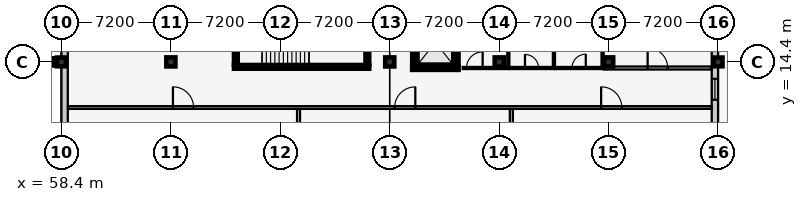
"""IFC4 building model, lengths in metres.
Left out: names, types, materials, properties, quantities, classifications, styles, units other than length and angle.
Written with IfcOpenShell. Run it as: python <this file> out.ifc"""

import sys

from ifc_helpers import new_model, si_unit, direction, frame, frame_2d, origin, origin_2d, place, context, subcontext, project, spatial, rectangle, extrude, element, fill, save


model = new_model("IFC4")
c1 = context("Model", 3, precision=1e-05, world=origin(), true_north=direction((0.0, 1.0)))
c2 = subcontext(c1, "Body", "Model", "MODEL_VIEW")
j1 = project(units=[si_unit("LENGTHUNIT", "METRE"), si_unit("PLANEANGLEUNIT", "RADIAN")], contexts=[c1])
p1 = place(None, origin())
s1 = spatial("IfcSite", under=j1, at=p1, CompositionType="ELEMENT")
p2 = place(p1, origin())
s2 = spatial("IfcBuilding", under=s1, at=p2, CompositionType="ELEMENT")
p3 = place(p2, frame((0.0, 0.0, 9.6)))
s3 = spatial("IfcBuildingStorey", under=s2, at=p3, CompositionType="ELEMENT", Elevation=9.6)
p4 = place(p3, frame((57.6, 14.4, 0.0), z_axis=(0.0, 0.0, 1.0), x_axis=(1.0, 0.0, 0.0)))
e1 = element("IfcColumn", 1, at=p4, inside=s3, PredefinedType="COLUMN", context=c2, shape_type="SweptSolid", body=[
    extrude(rectangle(XDim=0.48, YDim=0.48, at=origin_2d()), origin(), (0.0, 0.0, 1.0), 4.2),
])
p5 = place(p3, frame((58.4, 14.4, 0.0), z_axis=(0.0, 0.0, 1.0), x_axis=(1.0, 0.0, 0.0)))
e2 = element("IfcColumn", 2, at=p5, inside=s3, PredefinedType="COLUMN", context=c2, shape_type="SweptSolid", body=[
    extrude(rectangle(XDim=0.58, YDim=0.58, at=origin_2d()), origin(), (0.0, 0.0, 1.0), 4.2),
])
for number, where, z_axis, x_axis in (
    (3, (65.6, 14.4, 0.0), (0.0, 0.0, 1.0), (1.0, 0.0, 0.0)),
    (4, (80.0, 14.4, 0.0), (0.0, 0.0, 1.0), (1.0, 0.0, 0.0)),
    (5, (87.2, 14.4, 0.0), (0.0, 0.0, 1.0), (1.0, 0.0, 0.0)),
    (6, (94.4, 14.4, 0.0), (0.0, 0.0, 1.0), (1.0, 0.0, 0.0)),
):
    element("IfcColumn", number, at=place(p3, frame(where, z_axis=z_axis, x_axis=x_axis)), inside=s3, PredefinedType="COLUMN", context=c2, shape_type="SweptSolid", body=[
        extrude(rectangle(XDim=0.6, YDim=0.6, at=origin_2d()), origin(), (0.0, 0.0, 1.0), 4.2),
    ])
p6 = place(p3, frame((101.6, 14.4, 0.0), z_axis=(0.0, 0.0, 1.0), x_axis=(1.0, 0.0, 0.0)))
e7 = element("IfcColumn", 7, at=p6, inside=s3, PredefinedType="COLUMN", context=c2, shape_type="SweptSolid", body=[
    extrude(rectangle(XDim=0.58, YDim=0.58, at=origin_2d()), origin(), (0.0, 0.0, 1.0), 4.2),
])
p7 = place(p3, frame((101.39, 21.6, 0.0), z_axis=(0.0, 0.0, 1.0), x_axis=(0.0, -1.0, 0.0)))
e8 = element("IfcWall", 8, at=p7, inside=s3, PredefinedType="SOLIDWALL", context=c2, shape_type="SweptSolid", body=[
    extrude(rectangle(XDim=21.6, YDim=0.42, at=frame_2d((10.8, 0.0))), origin(), (0.0, 0.0, 1.0), 3.355),
])
p8 = place(p7, frame((1.225, 0.0, 0.9)))
e9 = element("IfcOpeningElement", 9, at=p8, cuts=e8, PredefinedType="OPENING", context=c2, shape_type="SweptSolid", body=[
    extrude(rectangle(XDim=1.15, YDim=1.6, at=frame_2d((0.575, 0.8))), frame((0.0, 0.222, 0.0), z_axis=(0.0, -1.0, 0.0), x_axis=(1.0, 0.0, 0.0)), (0.0, 0.0, 1.0), 0.444),
])
p9 = place(p7, frame((4.775, 0.0, 0.9)))
e10 = element("IfcOpeningElement", 10, at=p9, cuts=e8, PredefinedType="OPENING", context=c2, shape_type="SweptSolid", body=[
    extrude(rectangle(XDim=1.25, YDim=1.6, at=frame_2d((0.625, 0.8))), frame((0.0, 0.222, 0.0), z_axis=(0.0, -1.0, 0.0), x_axis=(1.0, 0.0, 0.0)), (0.0, 0.0, 1.0), 0.444),
])
p10 = place(p7, frame((8.31, 0.0, 0.9)))
e11 = element("IfcOpeningElement", 11, at=p10, cuts=e8, PredefinedType="OPENING", context=c2, shape_type="SweptSolid", body=[
    extrude(rectangle(XDim=1.38, YDim=1.6, at=frame_2d((0.69, 0.8))), frame((0.0, 0.222, 0.0), z_axis=(0.0, -1.0, 0.0), x_axis=(1.0, 0.0, 0.0)), (0.0, 0.0, 1.0), 0.444),
])
p11 = place(p7, frame((11.85, 0.0, 0.9)))
e12 = element("IfcOpeningElement", 12, at=p11, cuts=e8, PredefinedType="OPENING", context=c2, shape_type="SweptSolid", body=[
    extrude(rectangle(XDim=1.5, YDim=1.6, at=frame_2d((0.75, 0.8))), frame((0.0, 0.222, 0.0), z_axis=(0.0, -1.0, 0.0), x_axis=(1.0, 0.0, 0.0)), (0.0, 0.0, 1.0), 0.444),
])
p12 = place(p7, frame((15.7, 0.0, 0.9)))
e13 = element("IfcOpeningElement", 13, at=p12, cuts=e8, PredefinedType="OPENING", context=c2, shape_type="SweptSolid", body=[
    extrude(rectangle(XDim=1.0, YDim=1.75, at=frame_2d((0.5, 0.875))), frame((0.0, 0.222, 0.0), z_axis=(0.0, -1.0, 0.0), x_axis=(1.0, 0.0, 0.0)), (0.0, 0.0, 1.0), 0.444),
])
p13 = place(p7, frame((19.24, 0.0, 0.9)))
e14 = element("IfcOpeningElement", 14, at=p13, cuts=e8, PredefinedType="OPENING", context=c2, shape_type="SweptSolid", body=[
    extrude(rectangle(XDim=1.12, YDim=1.75, at=frame_2d((0.56, 0.875))), frame((0.0, 0.222, 0.0), z_axis=(0.0, -1.0, 0.0), x_axis=(1.0, 0.0, 0.0)), (0.0, 0.0, 1.0), 0.444),
])
p14 = place(p3, frame((58.61, 0.0, 0.0), z_axis=(0.0, 0.0, 1.0), x_axis=(0.0, 1.0, 0.0)))
e15 = element("IfcWall", 15, at=p14, inside=s3, PredefinedType="SOLIDWALL", context=c2, shape_type="SweptSolid", body=[
    extrude(rectangle(XDim=21.6, YDim=0.42, at=frame_2d((10.8, 0.0))), origin(), (0.0, 0.0, 1.0), 3.355),
])
p15 = place(p14, frame((1.225, 0.0, 0.9)))
e16 = element("IfcOpeningElement", 16, at=p15, cuts=e15, PredefinedType="OPENING", context=c2, shape_type="SweptSolid", body=[
    extrude(rectangle(XDim=1.15, YDim=1.45, at=frame_2d((0.575, 0.725))), frame((0.0, 0.222, 0.0), z_axis=(0.0, -1.0, 0.0), x_axis=(1.0, 0.0, 0.0)), (0.0, 0.0, 1.0), 0.444),
])
p16 = place(p14, frame((4.775, 0.0, 0.9)))
e17 = element("IfcOpeningElement", 17, at=p16, cuts=e15, PredefinedType="OPENING", context=c2, shape_type="SweptSolid", body=[
    extrude(rectangle(XDim=1.25, YDim=1.45, at=frame_2d((0.625, 0.725))), frame((0.0, 0.222, 0.0), z_axis=(0.0, -1.0, 0.0), x_axis=(1.0, 0.0, 0.0)), (0.0, 0.0, 1.0), 0.444),
])
p17 = place(p14, frame((8.325, 0.0, 0.9)))
e18 = element("IfcOpeningElement", 18, at=p17, cuts=e15, PredefinedType="OPENING", context=c2, shape_type="SweptSolid", body=[
    extrude(rectangle(XDim=1.35, YDim=1.45, at=frame_2d((0.675, 0.725))), frame((0.0, 0.222, 0.0), z_axis=(0.0, -1.0, 0.0), x_axis=(1.0, 0.0, 0.0)), (0.0, 0.0, 1.0), 0.444),
])
p18 = place(p14, frame((15.75, 0.0, 0.9)))
e19 = element("IfcOpeningElement", 19, at=p18, cuts=e15, PredefinedType="OPENING", context=c2, shape_type="SweptSolid", body=[
    extrude(rectangle(XDim=0.9, YDim=1.6, at=frame_2d((0.45, 0.8))), frame((0.0, 0.222, 0.0), z_axis=(0.0, -1.0, 0.0), x_axis=(1.0, 0.0, 0.0)), (0.0, 0.0, 1.0), 0.444),
])
p19 = place(p14, frame((19.275, 0.0, 0.9)))
e20 = element("IfcOpeningElement", 20, at=p19, cuts=e15, PredefinedType="OPENING", context=c2, shape_type="SweptSolid", body=[
    extrude(rectangle(XDim=1.05, YDim=1.6, at=frame_2d((0.525, 0.8))), frame((0.0, 0.222, 0.0), z_axis=(0.0, -1.0, 0.0), x_axis=(1.0, 0.0, 0.0)), (0.0, 0.0, 1.0), 0.444),
])
p20 = place(p3, frame((69.75, 14.075, 0.0), z_axis=(0.0, 0.0, 1.0), x_axis=(1.0, 0.0, 0.0)))
e21 = element("IfcWall", 21, at=p20, inside=s3, PredefinedType="SHEAR", context=c2, shape_type="SweptSolid", body=[
    extrude(rectangle(XDim=8.9, YDim=0.25, at=frame_2d((4.45, 0.0))), origin(), (0.0, 0.0, 1.0), 3.96),
])
p21 = place(p3, frame((69.875, 17.65, 0.0), z_axis=(0.0, 0.0, 1.0), x_axis=(0.0, -1.0, 0.0)))
e22 = element("IfcWall", 22, at=p21, inside=s3, PredefinedType="SHEAR", context=c2, shape_type="SweptSolid", body=[
    extrude(rectangle(XDim=3.45, YDim=0.25, at=frame_2d((1.725, 0.0))), origin(), (0.0, 0.0, 1.0), 3.96),
])
p22 = place(p21, frame((1.15, 0.0, 0.0)))
e23 = element("IfcOpeningElement", 23, at=p22, cuts=e22, PredefinedType="OPENING", context=c2, shape_type="SweptSolid", body=[
    extrude(rectangle(XDim=1.15, YDim=2.15, at=frame_2d((0.575, 1.075))), frame((0.0, 0.137, 0.0), z_axis=(0.0, -1.0, 0.0), x_axis=(1.0, 0.0, 0.0)), (0.0, 0.0, 1.0), 0.274),
])
p23 = place(p3, frame((78.525, 14.2, 0.0), z_axis=(0.0, 0.0, 1.0), x_axis=(0.0, 1.0, 0.0)))
e24 = element("IfcWall", 24, at=p23, inside=s3, PredefinedType="SHEAR", context=c2, shape_type="SweptSolid", body=[
    extrude(rectangle(XDim=3.45, YDim=0.25, at=frame_2d((1.725, 0.0))), origin(), (0.0, 0.0, 1.0), 3.96),
])
p24 = place(p3, frame((81.475, 14.0, 0.0), z_axis=(0.0, 0.0, 1.0), x_axis=(1.0, 0.0, 0.0)))
e25 = element("IfcWall", 25, at=p24, inside=s3, PredefinedType="SHEAR", context=c2, shape_type="SweptSolid", body=[
    extrude(rectangle(XDim=3.05, YDim=0.25, at=frame_2d((1.525, 0.0))), origin(), (0.0, 0.0, 1.0), 3.96),
])
p25 = place(p24, frame((0.725, 0.0, 0.0)))
e26 = element("IfcOpeningElement", 26, at=p25, cuts=e25, PredefinedType="OPENING", context=c2, shape_type="SweptSolid", body=[
    extrude(rectangle(XDim=1.6, YDim=2.3, at=frame_2d((0.8, 1.15))), frame((0.0, 0.137, 0.0), z_axis=(0.0, -1.0, 0.0), x_axis=(1.0, 0.0, 0.0)), (0.0, 0.0, 1.0), 0.274),
])
for number, where, z_axis, x_axis in (
    (27, (81.6, 17.4, 0.0), (0.0, 0.0, 1.0), (0.0, -1.0, 0.0)),
    (28, (84.4, 14.0, 0.0), (0.0, 0.0, 1.0), (0.0, 1.0, 0.0)),
):
    element("IfcWall", number, at=place(p3, frame(where, z_axis=z_axis, x_axis=x_axis)), inside=s3, PredefinedType="SHEAR", context=c2, shape_type="SweptSolid", body=[
        extrude(rectangle(XDim=3.4, YDim=0.25, at=frame_2d((1.7, 0.0))), origin(), (0.0, 0.0, 1.0), 3.96),
    ])
p26 = place(p3, frame((58.83, 11.4, 0.0), z_axis=(0.0, 0.0, 1.0), x_axis=(1.0, 0.0, 0.0)))
e29 = element("IfcWall", 29, at=p26, inside=s3, PredefinedType="PARTITIONING", context=c2, shape_type="SweptSolid", body=[
    extrude(rectangle(XDim=42.34, YDim=0.18, at=frame_2d((21.17, 0.0))), origin(), (0.0, 0.0, 1.0), 3.96),
])
p27 = place(p26, frame((6.905, 0.0, 0.0)))
e30 = element("IfcOpeningElement", 30, at=p27, cuts=e29, PredefinedType="OPENING", context=c2, shape_type="SweptSolid", body=[
    extrude(rectangle(XDim=1.36, YDim=2.2, at=frame_2d((0.68, 1.1))), frame((0.0, 0.102, 0.0), z_axis=(0.0, -1.0, 0.0), x_axis=(1.0, 0.0, 0.0)), (0.0, 0.0, 1.0), 0.204),
])
p28 = place(p26, frame((21.49, 0.0, 0.0)))
e31 = element("IfcOpeningElement", 31, at=p28, cuts=e29, PredefinedType="OPENING", context=c2, shape_type="SweptSolid", body=[
    extrude(rectangle(XDim=1.36, YDim=2.2, at=frame_2d((0.68, 1.1))), frame((0.0, 0.102, 0.0), z_axis=(0.0, -1.0, 0.0), x_axis=(1.0, 0.0, 0.0)), (0.0, 0.0, 1.0), 0.204),
])
p29 = place(p26, frame((35.075, 0.0, 0.0)))
e32 = element("IfcOpeningElement", 32, at=p29, cuts=e29, PredefinedType="OPENING", context=c2, shape_type="SweptSolid", body=[
    extrude(rectangle(XDim=1.36, YDim=2.2, at=frame_2d((0.68, 1.1))), frame((0.0, 0.102, 0.0), z_axis=(0.0, -1.0, 0.0), x_axis=(1.0, 0.0, 0.0)), (0.0, 0.0, 1.0), 0.204),
])
for number, where, z_axis, x_axis in (
    (33, (74.0, 0.43, 0.0), (0.0, 0.0, 1.0), (0.0, 1.0, 0.0)),
    (34, (88.0, 0.43, 0.0), (0.0, 0.0, 1.0), (0.0, 1.0, 0.0)),
):
    element("IfcWall", number, at=place(p3, frame(where, z_axis=z_axis, x_axis=x_axis)), inside=s3, PredefinedType="PARTITIONING", context=c2, shape_type="SweptSolid", body=[
        extrude(rectangle(XDim=10.87, YDim=0.2, at=frame_2d((5.435, 0.0))), origin(), (0.0, 0.0, 1.0), 3.96),
    ])
p30 = place(p3, frame((84.8, 14.0, 0.0), z_axis=(0.0, 0.0, 1.0), x_axis=(1.0, 0.0, 0.0)))
e35 = element("IfcWall", 35, at=p30, inside=s3, PredefinedType="PARTITIONING", context=c2, shape_type="SweptSolid", body=[
    extrude(rectangle(XDim=3.0, YDim=0.14, at=frame_2d((1.5, 0.0))), origin(), (0.0, 0.0, 1.0), 3.96),
])
p31 = place(p30, frame((0.25, 0.0, 0.0)))
e36 = element("IfcOpeningElement", 36, at=p31, cuts=e35, PredefinedType="OPENING", context=c2, shape_type="SweptSolid", body=[
    extrude(rectangle(XDim=1.06, YDim=2.1, at=frame_2d((0.53, 1.05))), frame((0.0, 0.082, 0.0), z_axis=(0.0, -1.0, 0.0), x_axis=(1.0, 0.0, 0.0)), (0.0, 0.0, 1.0), 0.164),
])
p32 = place(p3, frame((87.8, 14.08, 0.0), z_axis=(0.0, 0.0, 1.0), x_axis=(0.0, 1.0, 0.0)))
e37 = element("IfcWall", 37, at=p32, inside=s3, PredefinedType="PARTITIONING", context=c2, shape_type="SweptSolid", body=[
    extrude(rectangle(XDim=7.09, YDim=0.14, at=frame_2d((3.545, 0.0))), origin(), (0.0, 0.0, 1.0), 3.96),
])
p33 = place(p3, frame((87.88, 14.0, 0.0), z_axis=(0.0, 0.0, 1.0), x_axis=(1.0, 0.0, 0.0)))
e38 = element("IfcWall", 38, at=p33, inside=s3, PredefinedType="PARTITIONING", context=c2, shape_type="SweptSolid", body=[
    extrude(rectangle(XDim=2.92, YDim=0.14, at=frame_2d((1.46, 0.0))), origin(), (0.0, 0.0, 1.0), 3.96),
])
p34 = place(p33, frame((1.015, 0.0, 0.0)))
e39 = element("IfcOpeningElement", 39, at=p34, cuts=e38, PredefinedType="OPENING", context=c2, shape_type="SweptSolid", body=[
    extrude(rectangle(XDim=0.89, YDim=2.05, at=frame_2d((0.445, 1.025))), frame((0.0, 0.082, 0.0), z_axis=(0.0, -1.0, 0.0), x_axis=(1.0, 0.0, 0.0)), (0.0, 0.0, 1.0), 0.164),
])
p35 = place(p3, frame((90.8, 14.08, 0.0), z_axis=(0.0, 0.0, 1.0), x_axis=(0.0, 1.0, 0.0)))
e40 = element("IfcWall", 40, at=p35, inside=s3, PredefinedType="PARTITIONING", context=c2, shape_type="SweptSolid", body=[
    extrude(rectangle(XDim=7.09, YDim=0.14, at=frame_2d((3.545, 0.0))), origin(), (0.0, 0.0, 1.0), 3.745),
])
p36 = place(p3, frame((90.88, 14.0, 0.0), z_axis=(0.0, 0.0, 1.0), x_axis=(1.0, 0.0, 0.0)))
e41 = element("IfcWall", 41, at=p36, inside=s3, PredefinedType="PARTITIONING", context=c2, shape_type="SweptSolid", body=[
    extrude(rectangle(XDim=3.12, YDim=0.14, at=frame_2d((1.56, 0.0))), origin(), (0.0, 0.0, 1.0), 3.96),
])
p37 = place(p36, frame((1.105, 0.0, 0.0)))
e42 = element("IfcOpeningElement", 42, at=p37, cuts=e41, PredefinedType="OPENING", context=c2, shape_type="SweptSolid", body=[
    extrude(rectangle(XDim=0.91, YDim=2.06, at=frame_2d((0.455, 1.03))), frame((0.0, 0.082, 0.0), z_axis=(0.0, -1.0, 0.0), x_axis=(1.0, 0.0, 0.0)), (0.0, 0.0, 1.0), 0.164),
])
p38 = place(p3, frame((94.0, 14.08, 0.0), z_axis=(0.0, 0.0, 1.0), x_axis=(0.0, 1.0, 0.0)))
e43 = element("IfcWall", 43, at=p38, inside=s3, PredefinedType="PARTITIONING", context=c2, shape_type="SweptSolid", body=[
    extrude(rectangle(XDim=7.09, YDim=0.14, at=frame_2d((3.545, 0.0))), origin(), (0.0, 0.0, 1.0), 3.96),
])
p39 = place(p3, frame((94.08, 14.0, 0.0), z_axis=(0.0, 0.0, 1.0), x_axis=(1.0, 0.0, 0.0)))
e44 = element("IfcWall", 44, at=p39, inside=s3, PredefinedType="PARTITIONING", context=c2, shape_type="SweptSolid", body=[
    extrude(rectangle(XDim=7.09, YDim=0.2, at=frame_2d((3.545, 0.0))), origin(), (0.0, 0.0, 1.0), 3.96),
])
p40 = place(p39, frame((2.885, 0.0, 0.0)))
e45 = element("IfcOpeningElement", 45, at=p40, cuts=e44, PredefinedType="OPENING", context=c2, shape_type="SweptSolid", body=[
    extrude(rectangle(XDim=1.32, YDim=2.15, at=frame_2d((0.66, 1.075))), frame((0.0, 0.112, 0.0), z_axis=(0.0, -1.0, 0.0), x_axis=(1.0, 0.0, 0.0)), (0.0, 0.0, 1.0), 0.224),
])
p41 = place(p10, origin())
e46 = element("IfcWindow", 46, at=p41, inside=s3, PartitioningType="SINGLE_PANEL", PredefinedType="WINDOW", context=c2, shape_type="SweptSolid", body=[
    extrude(rectangle(XDim=1.38, YDim=1.6, at=frame_2d((0.69, 0.8))), frame((0.0, 0.03, 0.0), z_axis=(0.0, -1.0, 0.0), x_axis=(1.0, 0.0, 0.0)), (0.0, 0.0, 1.0), 0.06),
])
fill(e11, e46)
p42 = place(p25, origin())
e47 = element("IfcDoor", 47, at=p42, inside=s3, OperationType="DOUBLE_DOOR_SLIDING", PredefinedType="DOOR", context=c2, shape_type="SweptSolid", body=[
    extrude(rectangle(XDim=1.6, YDim=2.3, at=frame_2d((0.8, 1.15))), frame((0.0, 0.025, 0.0), z_axis=(0.0, -1.0, 0.0), x_axis=(1.0, 0.0, 0.0)), (0.0, 0.0, 1.0), 0.05),
])
fill(e26, e47)
p43 = place(p27, origin())
e48 = element("IfcDoor", 48, at=p43, inside=s3, OperationType="SINGLE_SWING_LEFT", PredefinedType="DOOR", context=c2, shape_type="SweptSolid", body=[
    extrude(rectangle(XDim=1.36, YDim=2.2, at=frame_2d((0.68, 1.1))), frame((0.0, 0.025, 0.0), z_axis=(0.0, -1.0, 0.0), x_axis=(1.0, 0.0, 0.0)), (0.0, 0.0, 1.0), 0.05),
])
fill(e30, e48)
p44 = place(p28, origin())
e49 = element("IfcDoor", 49, at=p44, inside=s3, OperationType="SINGLE_SWING_RIGHT", PredefinedType="DOOR", context=c2, shape_type="SweptSolid", body=[
    extrude(rectangle(XDim=1.36, YDim=2.2, at=frame_2d((0.68, 1.1))), frame((0.0, 0.025, 0.0), z_axis=(0.0, -1.0, 0.0), x_axis=(1.0, 0.0, 0.0)), (0.0, 0.0, 1.0), 0.05),
])
fill(e31, e49)
p45 = place(p29, origin())
e50 = element("IfcDoor", 50, at=p45, inside=s3, OperationType="SINGLE_SWING_LEFT", PredefinedType="DOOR", context=c2, shape_type="SweptSolid", body=[
    extrude(rectangle(XDim=1.36, YDim=2.2, at=frame_2d((0.68, 1.1))), frame((0.0, 0.025, 0.0), z_axis=(0.0, -1.0, 0.0), x_axis=(1.0, 0.0, 0.0)), (0.0, 0.0, 1.0), 0.05),
])
fill(e32, e50)
p46 = place(p31, origin())
e51 = element("IfcDoor", 51, at=p46, inside=s3, OperationType="SINGLE_SWING_RIGHT", PredefinedType="DOOR", context=c2, shape_type="SweptSolid", body=[
    extrude(rectangle(XDim=1.06, YDim=2.1, at=frame_2d((0.53, 1.05))), frame((0.0, 0.025, 0.0), z_axis=(0.0, -1.0, 0.0), x_axis=(1.0, 0.0, 0.0)), (0.0, 0.0, 1.0), 0.05),
])
fill(e36, e51)
p47 = place(p34, origin())
e52 = element("IfcDoor", 52, at=p47, inside=s3, OperationType="SINGLE_SWING_LEFT", PredefinedType="DOOR", context=c2, shape_type="SweptSolid", body=[
    extrude(rectangle(XDim=0.89, YDim=2.05, at=frame_2d((0.445, 1.025))), frame((0.0, 0.025, 0.0), z_axis=(0.0, -1.0, 0.0), x_axis=(1.0, 0.0, 0.0)), (0.0, 0.0, 1.0), 0.05),
])
fill(e39, e52)
p48 = place(p37, origin())
e53 = element("IfcDoor", 53, at=p48, inside=s3, OperationType="SINGLE_SWING_RIGHT", PredefinedType="DOOR", context=c2, shape_type="SweptSolid", body=[
    extrude(rectangle(XDim=0.91, YDim=2.06, at=frame_2d((0.455, 1.03))), frame((0.0, 0.025, 0.0), z_axis=(0.0, -1.0, 0.0), x_axis=(1.0, 0.0, 0.0)), (0.0, 0.0, 1.0), 0.05),
])
fill(e42, e53)
p49 = place(p40, origin())
e54 = element("IfcDoor", 54, at=p49, inside=s3, OperationType="SINGLE_SWING_LEFT", PredefinedType="DOOR", context=c2, shape_type="SweptSolid", body=[
    extrude(rectangle(XDim=1.32, YDim=2.15, at=frame_2d((0.66, 1.075))), frame((0.0, 0.025, 0.0), z_axis=(0.0, -1.0, 0.0), x_axis=(1.0, 0.0, 0.0)), (0.0, 0.0, 1.0), 0.05),
])
fill(e45, e54)
save(model, sys.argv[1])
